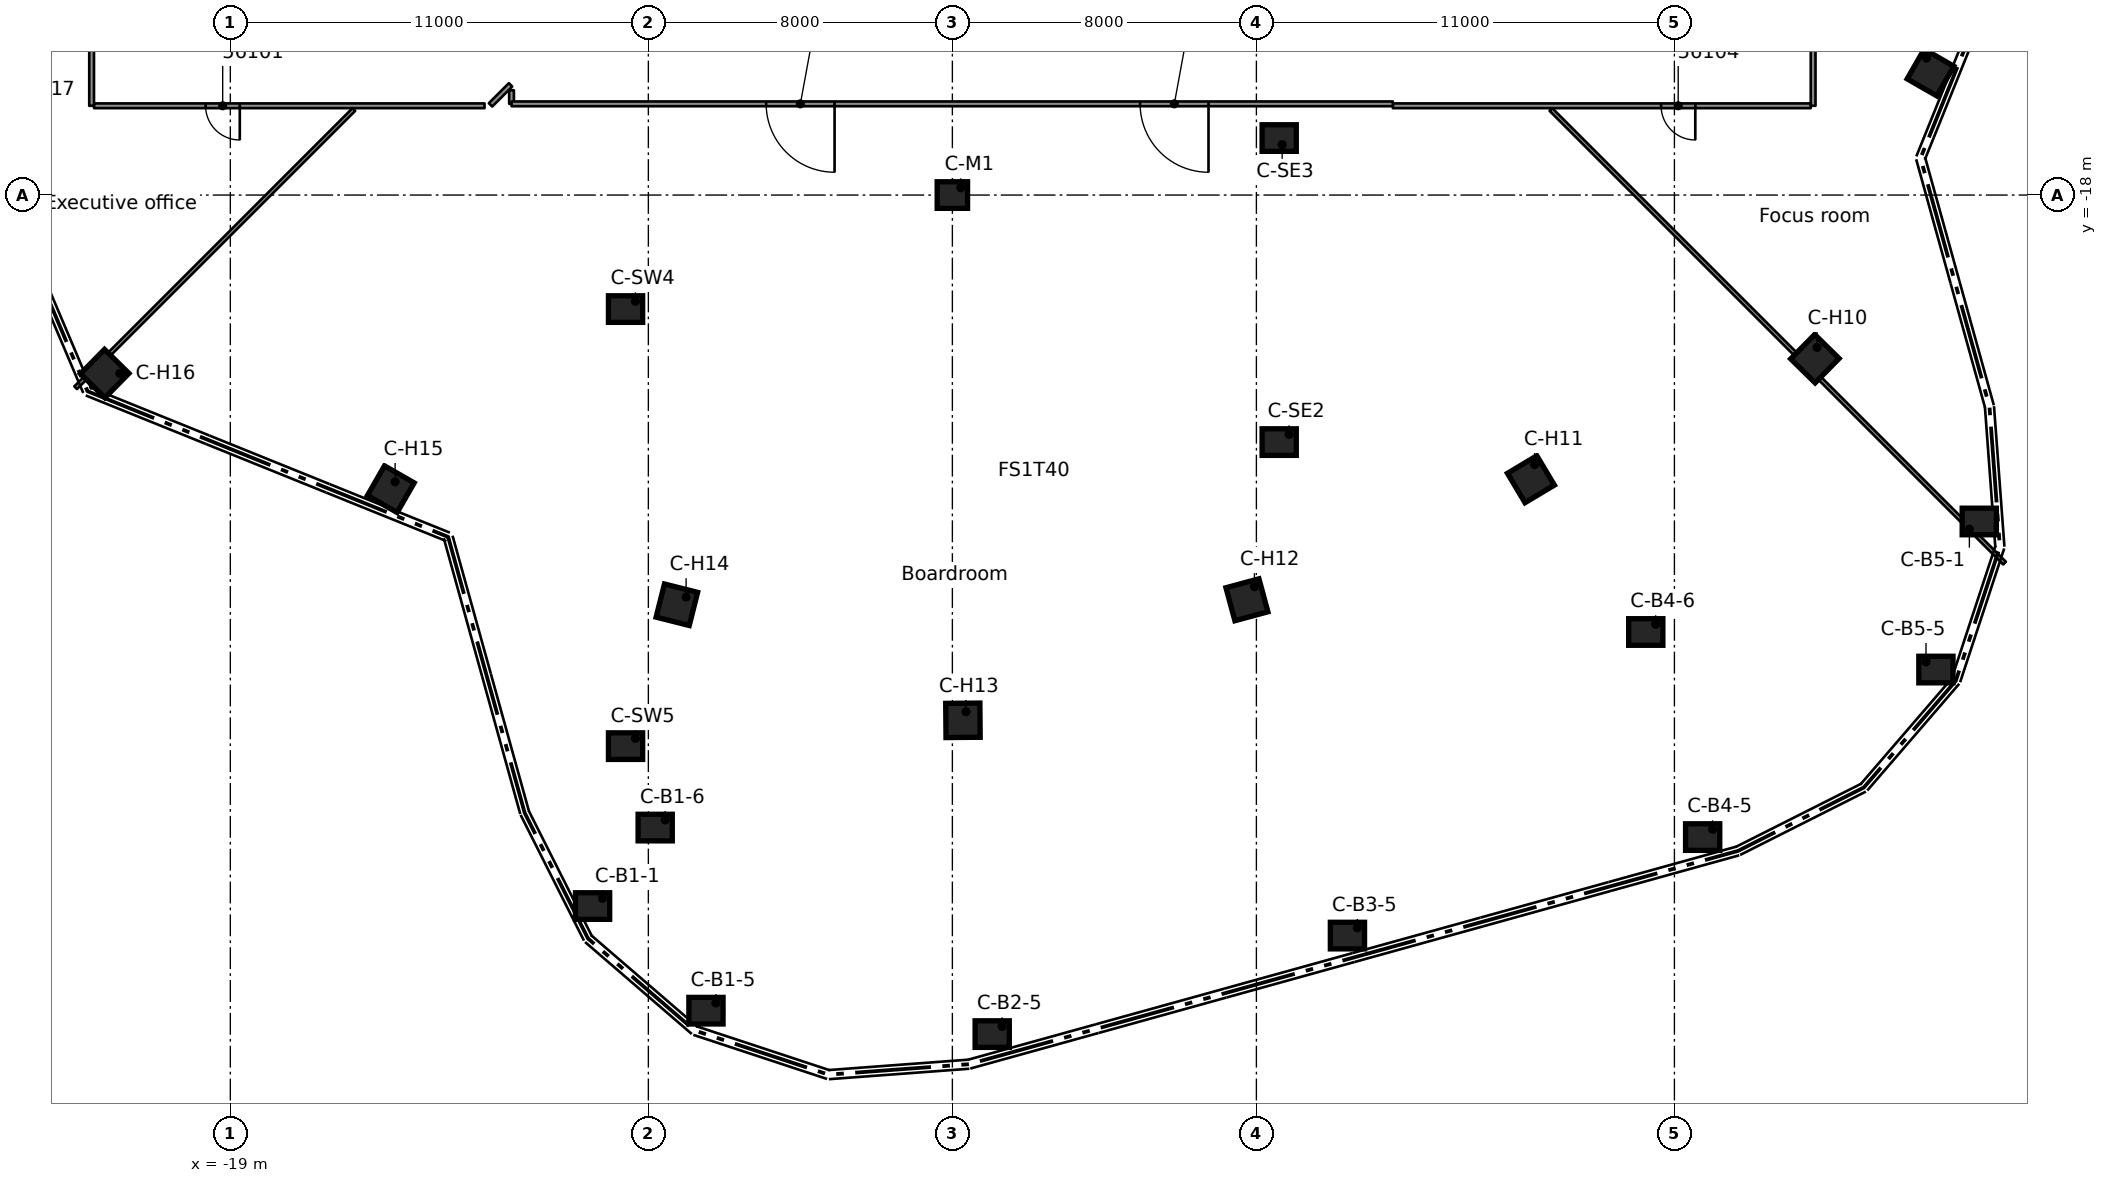
"""IFC4 building model, lengths in metres.
Left out: names, types, materials, properties, quantities, classifications, styles, units other than length and angle.
Written with IfcOpenShell. Run it as: python <this file> out.ifc"""

import sys

from ifc_helpers import new_model, si_unit, direction, frame, frame_2d, origin, origin_2d, place, context, subcontext, project, spatial, rectangle, extrude, element, fill, save


model = new_model("IFC4")
c1 = context("Model", 3, precision=1e-05, world=origin(), true_north=direction((0.0, 1.0)))
c2 = subcontext(c1, "Body", "Model", "MODEL_VIEW")
j1 = project(units=[si_unit("LENGTHUNIT", "METRE"), si_unit("PLANEANGLEUNIT", "RADIAN")], contexts=[c1])
p1 = place(None, origin())
s1 = spatial("IfcSite", under=j1, at=p1, CompositionType="ELEMENT")
p2 = place(p1, origin())
s2 = spatial("IfcBuilding", under=s1, at=p2, CompositionType="ELEMENT")
p3 = place(p2, frame((0.0, 0.0, 278.9)))
s3 = spatial("IfcBuildingStorey", under=s2, at=p3, CompositionType="ELEMENT", Elevation=278.9)
for number, where, z_axis, x_axis in (
    (1, (-9.468, -36.708, 0.0), (0.0, 0.0, 1.0), (1.0, 0.0, 0.0)),
    (2, (-6.484, -39.461, 0.0), (0.0, 0.0, 1.0), (1.0, 0.0, 0.0)),
    (3, (-7.82, -34.643, 0.0), (0.0, 0.0, 1.0), (1.0, 0.0, 0.0)),
    (4, (1.048, -40.077, 0.0), (0.0, 0.0, 1.0), (1.0, 0.0, 0.0)),
    (5, (10.396, -37.485, 0.0), (0.0, 0.0, 1.0), (1.0, 0.0, 0.0)),
    (6, (19.743, -34.893, 0.0), (0.0, 0.0, 1.0), (1.0, 0.0, 0.0)),
    (7, (18.246, -29.497, 0.0), (0.0, 0.0, 1.0), (1.0, 0.0, 0.0)),
    (8, (27.022, -26.589, 0.0), (0.0, 0.0, 1.0), (1.0, 0.0, 0.0)),
    (9, (25.881, -30.485, 0.0), (0.0, 0.0, 1.0), (1.0, 0.0, 0.0)),
):
    element("IfcColumn", number, at=place(p3, frame(where, z_axis=z_axis, x_axis=x_axis)), inside=s3, PredefinedType="COLUMN", context=c2, shape_type="SweptSolid", body=[
        extrude(rectangle(XDim=0.9, YDim=0.7, at=origin_2d()), origin(), (0.0, 0.0, 1.0), 3.5),
    ])
for number, where, z_axis, x_axis in (
    (10, (25.739, -14.777, 0.0), (0.0, 0.0, 1.0), (0.867, -0.498, 0.0)),
    (11, (22.697, -22.305, 0.0), (0.0, 0.0, 1.0), (0.713, -0.701, 0.0)),
    (12, (15.224, -25.477, 0.0), (0.0, 0.0, 1.0), (0.513, -0.858, 0.0)),
    (13, (7.751, -28.649, 0.0), (0.0, 0.0, 1.0), (0.261, -0.965, 0.0)),
    (14, (0.278, -31.821, 0.0), (0.0, 0.0, 1.0), (0.009, -1.0, 0.0)),
    (15, (-7.25, -28.78, 0.0), (0.0, 0.0, 1.0), (-0.244, -0.97, 0.0)),
    (16, (-14.777, -25.739, 0.0), (0.0, 0.0, 1.0), (-0.498, -0.867, 0.0)),
    (17, (-22.305, -22.697, 0.0), (0.0, 0.0, 1.0), (-0.701, -0.713, 0.0)),
):
    element("IfcColumn", number, at=place(p3, frame(where, z_axis=z_axis, x_axis=x_axis)), inside=s3, PredefinedType="COLUMN", context=c2, shape_type="SweptSolid", body=[
        extrude(rectangle(XDim=0.9, YDim=0.9, at=origin_2d()), origin(), (0.0, 0.0, 1.0), 3.5),
    ])
p4 = place(p3, frame((0.0, -18.0, 0.0), z_axis=(0.0, 0.0, 1.0), x_axis=(1.0, 0.0, 0.0)))
e18 = element("IfcColumn", 18, at=p4, inside=s3, PredefinedType="COLUMN", context=c2, shape_type="SweptSolid", body=[
    extrude(rectangle(XDim=0.8, YDim=0.7, at=origin_2d()), origin(), (0.0, 0.0, 1.0), 3.5),
])
for number, where, z_axis, x_axis in (
    (19, (8.6, -24.5, 0.0), (0.0, 0.0, 1.0), (1.0, 0.0, 0.0)),
    (20, (8.6, -16.5, 0.0), (0.0, 0.0, 1.0), (1.0, 0.0, 0.0)),
    (21, (-8.6, -21.0, 0.0), (0.0, 0.0, 1.0), (1.0, 0.0, 0.0)),
    (22, (-8.6, -32.5, 0.0), (0.0, 0.0, 1.0), (1.0, 0.0, 0.0)),
):
    element("IfcColumn", number, at=place(p3, frame(where, z_axis=z_axis, x_axis=x_axis)), inside=s3, PredefinedType="COLUMN", context=c2, shape_type="SweptSolid", body=[
        extrude(rectangle(XDim=0.9, YDim=0.7, at=origin_2d()), origin(), (0.0, 0.0, 1.0), 3.5),
    ])
p5 = place(p3, frame((-11.601, -15.242, 0.0), z_axis=(0.0, 0.0, 1.0), x_axis=(0.002734097778, -0.999996262348, 0.0)))
e23 = element("IfcWall", 23, at=p5, inside=s3, PredefinedType="PARTITIONING", context=c2, shape_type="SweptSolid", body=[
    extrude(rectangle(XDim=0.357, YDim=0.125, at=frame_2d((0.179, 0.0))), origin(), (0.0, 0.0, 1.0), 3.08),
])
p6 = place(p3, frame((27.687, -27.685, 0.0), z_axis=(0.0, 0.0, 1.0), x_axis=(-0.70713570585, 0.70707785534, 0.0)))
e24 = element("IfcWall", 24, at=p6, inside=s3, PredefinedType="PARTITIONING", context=c2, shape_type="SweptSolid", body=[
    extrude(rectangle(XDim=16.881, YDim=0.1, at=frame_2d((8.44, 0.0))), origin(), (0.0, 0.0, 1.0), 3.08),
])
p7 = place(p3, frame((-12.311, -15.651, 0.0), z_axis=(0.0, 0.0, 1.0), x_axis=(-1.0, 0.0, 0.0)))
e25 = element("IfcWall", 25, at=p7, inside=s3, PredefinedType="PARTITIONING", context=c2, shape_type="SweptSolid", body=[
    extrude(rectangle(XDim=10.276, YDim=0.125, at=frame_2d((5.138, 0.0))), origin(), (0.0, 0.0, 1.0), 3.08),
])
p8 = place(p7, frame((6.44, 0.0, 0.0)))
e26 = element("IfcOpeningElement", 26, at=p8, cuts=e25, PredefinedType="OPENING", context=c2, shape_type="SweptSolid", body=[
    extrude(rectangle(XDim=0.9, YDim=2.1, at=frame_2d((0.45, 1.05))), frame((0.0, 0.073, 0.0), z_axis=(0.0, -1.0, 0.0), x_axis=(1.0, 0.0, 0.0)), (0.0, 0.0, 1.0), 0.145),
])
p9 = place(p3, frame((22.587, -15.651, 0.0), z_axis=(0.0, 0.0, 1.0), x_axis=(-1.0, 0.0, 0.0)))
e27 = element("IfcWall", 27, at=p9, inside=s3, PredefinedType="PARTITIONING", context=c2, shape_type="SweptSolid", body=[
    extrude(rectangle(XDim=10.996, YDim=0.125, at=frame_2d((5.498, 0.0))), origin(), (0.0, 0.0, 1.0), 3.08),
])
p10 = place(p9, frame((3.038, 0.0, 0.0)))
e28 = element("IfcOpeningElement", 28, at=p10, cuts=e27, PredefinedType="OPENING", context=c2, shape_type="SweptSolid", body=[
    extrude(rectangle(XDim=0.9, YDim=2.1, at=frame_2d((0.45, 1.05))), frame((0.0, 0.073, 0.0), z_axis=(0.0, -1.0, 0.0), x_axis=(1.0, 0.0, 0.0)), (0.0, 0.0, 1.0), 0.145),
])
p11 = place(p3, frame((11.59, -15.6, 0.0), z_axis=(0.0, 0.0, 1.0), x_axis=(-1.0, 0.0, 0.0)))
e29 = element("IfcWall", 29, at=p11, inside=s3, PredefinedType="PARTITIONING", context=c2, shape_type="SweptSolid", body=[
    extrude(rectangle(XDim=23.189, YDim=0.125, at=frame_2d((11.595, 0.0))), origin(), (0.0, 0.0, 1.0), 3.08),
])
p12 = place(p11, frame((14.69, 0.0, 0.0)))
e30 = element("IfcOpeningElement", 30, at=p12, cuts=e29, PredefinedType="OPENING", context=c2, shape_type="SweptSolid", body=[
    extrude(rectangle(XDim=1.8, YDim=2.1, at=frame_2d((0.9, 1.05))), frame((0.0, 0.073, 0.0), z_axis=(0.0, -1.0, 0.0), x_axis=(1.0, 0.0, 0.0)), (0.0, 0.0, 1.0), 0.145),
])
p13 = place(p11, frame((4.85, 0.0, 0.0)))
e31 = element("IfcOpeningElement", 31, at=p13, cuts=e29, PredefinedType="OPENING", context=c2, shape_type="SweptSolid", body=[
    extrude(rectangle(XDim=1.8, YDim=2.1, at=frame_2d((0.9, 1.05))), frame((0.0, 0.073, 0.0), z_axis=(0.0, -1.0, 0.0), x_axis=(1.0, 0.0, 0.0)), (0.0, 0.0, 1.0), 0.145),
])
p14 = place(p3, frame((-12.153, -15.627, 0.0), z_axis=(0.0, 0.0, 1.0), x_axis=(0.707270558084, 0.706942966348, 0.0)))
e32 = element("IfcWall", 32, at=p14, inside=s3, PredefinedType="PARTITIONING", context=c2, shape_type="SweptSolid", body=[
    extrude(rectangle(XDim=0.745, YDim=0.125, at=frame_2d((0.373, 0.0))), origin(), (0.0, 0.0, 1.0), 3.08),
])
p15 = place(p3, frame((-23.07, -23.07, 0.0), z_axis=(0.0, 0.0, 1.0), x_axis=(0.707106781187, 0.707106781187, 0.0)))
e33 = element("IfcWall", 33, at=p15, inside=s3, PredefinedType="PARTITIONING", context=c2, shape_type="SweptSolid", body=[
    extrude(rectangle(XDim=10.354, YDim=0.1, at=frame_2d((5.177, 0.0))), origin(), (0.0, 0.0, 1.0), 3.08),
])
p16 = place(p3, frame((22.65, 15.651, 0.0), z_axis=(0.0, 0.0, 1.0), x_axis=(0.0, -1.0, 0.0)))
e34 = element("IfcWall", 34, at=p16, inside=s3, PredefinedType="PARTITIONING", context=c2, shape_type="SweptSolid", body=[
    extrude(rectangle(XDim=31.302, YDim=0.125, at=frame_2d((15.651, 0.0))), origin(), (0.0, 0.0, 1.0), 3.08),
])
p17 = place(p16, frame((22.251, 0.0, 0.0)))
e35 = element("IfcOpeningElement", 35, at=p17, cuts=e34, PredefinedType="OPENING", context=c2, shape_type="SweptSolid", body=[
    extrude(rectangle(XDim=0.9, YDim=2.1, at=frame_2d((0.45, 1.05))), frame((0.0, 0.073, 0.0), z_axis=(0.0, -1.0, 0.0), x_axis=(1.0, 0.0, 0.0)), (0.0, 0.0, 1.0), 0.145),
])
p18 = place(p16, frame((11.751, 0.0, 0.0)))
e36 = element("IfcOpeningElement", 36, at=p18, cuts=e34, PredefinedType="OPENING", context=c2, shape_type="SweptSolid", body=[
    extrude(rectangle(XDim=0.9, YDim=2.1, at=frame_2d((0.45, 1.05))), frame((0.0, 0.073, 0.0), z_axis=(0.0, -1.0, 0.0), x_axis=(1.0, 0.0, 0.0)), (0.0, 0.0, 1.0), 0.145),
])
p19 = place(p16, frame((4.251, 0.0, 0.0)))
e37 = element("IfcOpeningElement", 37, at=p19, cuts=e34, PredefinedType="OPENING", context=c2, shape_type="SweptSolid", body=[
    extrude(rectangle(XDim=1.8, YDim=2.1, at=frame_2d((0.9, 1.05))), frame((0.0, 0.073, 0.0), z_axis=(0.0, -1.0, 0.0), x_axis=(1.0, 0.0, 0.0)), (0.0, 0.0, 1.0), 0.145),
])
p20 = place(p3, frame((-22.65, -15.651, 0.0), z_axis=(0.0, 0.0, 1.0), x_axis=(0.0, 1.0, 0.0)))
e38 = element("IfcWall", 38, at=p20, inside=s3, PredefinedType="PARTITIONING", context=c2, shape_type="SweptSolid", body=[
    extrude(rectangle(XDim=31.302, YDim=0.125, at=frame_2d((15.651, 0.0))), origin(), (0.0, 0.0, 1.0), 3.08),
])
p21 = place(p20, frame((12.251, 0.0, 0.0)))
e39 = element("IfcOpeningElement", 39, at=p21, cuts=e38, PredefinedType="OPENING", context=c2, shape_type="SweptSolid", body=[
    extrude(rectangle(XDim=0.9, YDim=2.1, at=frame_2d((0.45, 1.05))), frame((0.0, 0.073, 0.0), z_axis=(0.0, -1.0, 0.0), x_axis=(1.0, 0.0, 0.0)), (0.0, 0.0, 1.0), 0.145),
])
p22 = place(p20, frame((26.252, 0.0, 0.0)))
e40 = element("IfcOpeningElement", 40, at=p22, cuts=e38, PredefinedType="OPENING", context=c2, shape_type="SweptSolid", body=[
    extrude(rectangle(XDim=0.9, YDim=2.1, at=frame_2d((0.45, 1.05))), frame((0.0, 0.073, 0.0), z_axis=(0.0, -1.0, 0.0), x_axis=(1.0, 0.0, 0.0)), (0.0, 0.0, 1.0), 0.145),
])
p23 = place(p8, origin())
e41 = element("IfcDoor", 41, at=p23, inside=s3, OperationType="SINGLE_SWING_RIGHT", PredefinedType="DOOR", context=c2, shape_type="SweptSolid", body=[
    extrude(rectangle(XDim=0.9, YDim=2.1, at=frame_2d((0.45, 1.05))), frame((0.0, 0.025, 0.0), z_axis=(0.0, -1.0, 0.0), x_axis=(1.0, 0.0, 0.0)), (0.0, 0.0, 1.0), 0.05),
])
fill(e26, e41)
p24 = place(p12, origin())
e42 = element("IfcDoor", 42, at=p24, inside=s3, OperationType="DOUBLE_DOOR_SINGLE_SWING", PredefinedType="DOOR", context=c2, shape_type="SweptSolid", body=[
    extrude(rectangle(XDim=1.8, YDim=2.1, at=frame_2d((0.9, 1.05))), frame((0.0, 0.025, 0.0), z_axis=(0.0, -1.0, 0.0), x_axis=(1.0, 0.0, 0.0)), (0.0, 0.0, 1.0), 0.05),
])
fill(e30, e42)
p25 = place(p13, origin())
e43 = element("IfcDoor", 43, at=p25, inside=s3, OperationType="DOUBLE_DOOR_SINGLE_SWING", PredefinedType="DOOR", context=c2, shape_type="SweptSolid", body=[
    extrude(rectangle(XDim=1.8, YDim=2.1, at=frame_2d((0.9, 1.05))), frame((0.0, 0.025, 0.0), z_axis=(0.0, -1.0, 0.0), x_axis=(1.0, 0.0, 0.0)), (0.0, 0.0, 1.0), 0.05),
])
fill(e31, e43)
p26 = place(p10, origin())
e44 = element("IfcDoor", 44, at=p26, inside=s3, OperationType="SINGLE_SWING_LEFT", PredefinedType="DOOR", context=c2, shape_type="SweptSolid", body=[
    extrude(rectangle(XDim=0.9, YDim=2.1, at=frame_2d((0.45, 1.05))), frame((0.0, 0.025, 0.0), z_axis=(0.0, -1.0, 0.0), x_axis=(1.0, 0.0, 0.0)), (0.0, 0.0, 1.0), 0.05),
])
fill(e28, e44)
save(model, sys.argv[1])
